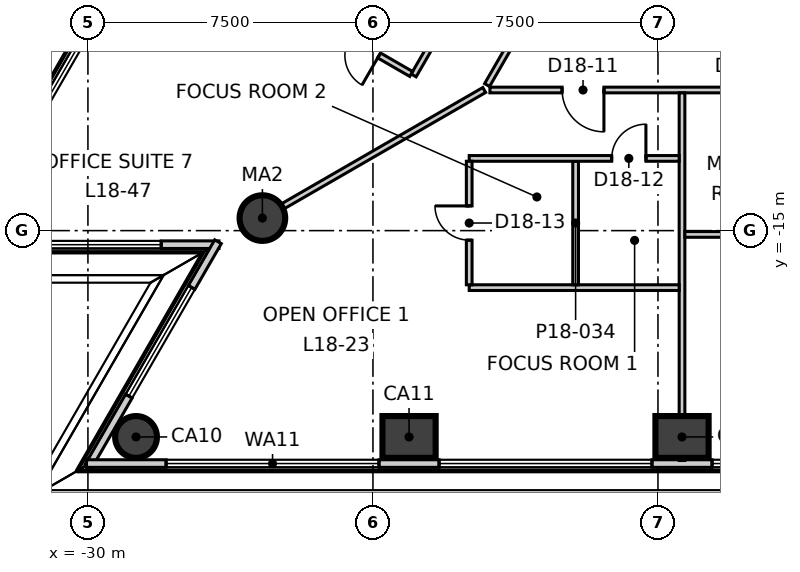
"""IFC4 building model, lengths in metres.
Left out: names, types, materials, properties, quantities, classifications, styles, units other than length and angle.
Written with IfcOpenShell. Run it as: python <this file> out.ifc"""

import sys

from ifc_helpers import new_model, si_unit, direction, frame, frame_2d, origin, origin_2d, place, context, subcontext, project, spatial, rectangle, circle, extrude, element, fill, save


model = new_model("IFC4")
c1 = context("Model", 3, precision=1e-05, world=origin(), true_north=direction((0.0, 1.0)))
c2 = subcontext(c1, "Body", "Model", "MODEL_VIEW")
j1 = project(units=[si_unit("LENGTHUNIT", "METRE"), si_unit("PLANEANGLEUNIT", "RADIAN")], contexts=[c1])
p1 = place(None, origin())
s1 = spatial("IfcSite", under=j1, at=p1, CompositionType="ELEMENT")
p2 = place(p1, origin())
s2 = spatial("IfcBuilding", under=s1, at=p2, CompositionType="ELEMENT")
p3 = place(p2, frame((0.0, 0.0, 83.3)))
s3 = spatial("IfcBuildingStorey", under=s2, at=p3, CompositionType="ELEMENT", Elevation=83.3)
p4 = place(p3, frame((-28.734, -20.429, -0.3), z_axis=(0.0, 0.0, 1.0), x_axis=(1.0, 0.0, 0.0)))
e1 = element("IfcColumn", 1, at=p4, inside=s3, PredefinedType="COLUMN", context=c2, shape_type="SweptSolid", body=[
    extrude(circle(Radius=0.55, at=origin_2d()), origin(), (0.0, 0.0, 1.0), 4.0),
])
for number, where, z_axis, x_axis in (
    (2, (-21.55, -20.429, -0.3), (0.0, 0.0, 1.0), (1.0, 0.0, 0.0)),
    (3, (-14.367, -20.429, -0.3), (0.0, 0.0, 1.0), (1.0, 0.0, 0.0)),
):
    element("IfcColumn", number, at=place(p3, frame(where, z_axis=z_axis, x_axis=x_axis)), inside=s3, PredefinedType="COLUMN", context=c2, shape_type="SweptSolid", body=[
        extrude(rectangle(XDim=1.4, YDim=1.1, at=origin_2d()), origin(), (0.0, 0.0, 1.0), 4.0),
    ])
p5 = place(p3, frame((-25.409, -14.67, -0.3), z_axis=(0.0, 0.0, 1.0), x_axis=(1.0, 0.0, 0.0)))
e4 = element("IfcColumn", 4, at=p5, inside=s3, PredefinedType="COLUMN", context=c2, shape_type="SweptSolid", body=[
    extrude(circle(Radius=0.6, at=origin_2d()), origin(), (0.0, 0.0, 1.0), 4.0),
])
p6 = place(p3, frame((-3.28, 36.577, 0.0), z_axis=(0.0, 0.0, 1.0), x_axis=(-0.500001635065, -0.866024459777, 0.0)))
e5 = element("IfcWall", 5, at=p6, inside=s3, PredefinedType="ELEMENTEDWALL", context=c2, shape_type="SweptSolid", body=[
    extrude(rectangle(XDim=60.053, YDim=0.2, at=frame_2d((30.027, 0.0))), origin(), (0.0, 0.0, 1.0), 3.7),
])
p7 = place(p6, frame((2.094, 0.0, 0.9)))
e6 = element("IfcOpeningElement", 6, at=p7, cuts=e5, PredefinedType="OPENING", context=c2, shape_type="SweptSolid", body=[
    extrude(rectangle(XDim=5.6, YDim=2.5, at=frame_2d((2.8, 1.25))), frame((0.0, 0.11, 0.0), z_axis=(0.0, -1.0, 0.0), x_axis=(1.0, 0.0, 0.0)), (0.0, 0.0, 1.0), 0.22),
])
p8 = place(p6, frame((9.278, 0.0, 0.9)))
e7 = element("IfcOpeningElement", 7, at=p8, cuts=e5, PredefinedType="OPENING", context=c2, shape_type="SweptSolid", body=[
    extrude(rectangle(XDim=5.6, YDim=2.5, at=frame_2d((2.8, 1.25))), frame((0.0, 0.11, 0.0), z_axis=(0.0, -1.0, 0.0), x_axis=(1.0, 0.0, 0.0)), (0.0, 0.0, 1.0), 0.22),
])
p9 = place(p6, frame((16.461, 0.0, 0.9)))
e8 = element("IfcOpeningElement", 8, at=p9, cuts=e5, PredefinedType="OPENING", context=c2, shape_type="SweptSolid", body=[
    extrude(rectangle(XDim=5.6, YDim=2.5, at=frame_2d((2.8, 1.25))), frame((0.0, 0.11, 0.0), z_axis=(0.0, -1.0, 0.0), x_axis=(1.0, 0.0, 0.0)), (0.0, 0.0, 1.0), 0.22),
])
p10 = place(p6, frame((23.645, 0.0, 0.9)))
e9 = element("IfcOpeningElement", 9, at=p10, cuts=e5, PredefinedType="OPENING", context=c2, shape_type="SweptSolid", body=[
    extrude(rectangle(XDim=5.6, YDim=2.5, at=frame_2d((2.8, 1.25))), frame((0.0, 0.11, 0.0), z_axis=(0.0, -1.0, 0.0), x_axis=(1.0, 0.0, 0.0)), (0.0, 0.0, 1.0), 0.22),
])
p11 = place(p6, frame((30.828, 0.0, 0.9)))
e10 = element("IfcOpeningElement", 10, at=p11, cuts=e5, PredefinedType="OPENING", context=c2, shape_type="SweptSolid", body=[
    extrude(rectangle(XDim=5.6, YDim=2.5, at=frame_2d((2.8, 1.25))), frame((0.0, 0.11, 0.0), z_axis=(0.0, -1.0, 0.0), x_axis=(1.0, 0.0, 0.0)), (0.0, 0.0, 1.0), 0.22),
])
p12 = place(p6, frame((38.012, 0.0, 0.9)))
e11 = element("IfcOpeningElement", 11, at=p12, cuts=e5, PredefinedType="OPENING", context=c2, shape_type="SweptSolid", body=[
    extrude(rectangle(XDim=5.6, YDim=2.5, at=frame_2d((2.8, 1.25))), frame((0.0, 0.11, 0.0), z_axis=(0.0, -1.0, 0.0), x_axis=(1.0, 0.0, 0.0)), (0.0, 0.0, 1.0), 0.22),
])
p13 = place(p6, frame((45.195, 0.0, 0.9)))
e12 = element("IfcOpeningElement", 12, at=p13, cuts=e5, PredefinedType="OPENING", context=c2, shape_type="SweptSolid", body=[
    extrude(rectangle(XDim=5.6, YDim=2.5, at=frame_2d((2.8, 1.25))), frame((0.0, 0.11, 0.0), z_axis=(0.0, -1.0, 0.0), x_axis=(1.0, 0.0, 0.0)), (0.0, 0.0, 1.0), 0.22),
])
p14 = place(p6, frame((52.379, 0.0, 0.9)))
e13 = element("IfcOpeningElement", 13, at=p14, cuts=e5, PredefinedType="OPENING", context=c2, shape_type="SweptSolid", body=[
    extrude(rectangle(XDim=5.6, YDim=2.5, at=frame_2d((2.8, 1.25))), frame((0.0, 0.11, 0.0), z_axis=(0.0, -1.0, 0.0), x_axis=(1.0, 0.0, 0.0)), (0.0, 0.0, 1.0), 0.22),
])
p15 = place(p3, frame((-33.362, -15.37, 0.0), z_axis=(0.0, 0.0, 1.0), x_axis=(1.0, 0.0, 0.0)))
e14 = element("IfcWall", 14, at=p15, inside=s3, PredefinedType="ELEMENTEDWALL", context=c2, shape_type="SweptSolid", body=[
    extrude(rectangle(XDim=6.81, YDim=0.2, at=frame_2d((3.405, 0.0))), origin(), (0.0, 0.0, 1.0), 3.7),
])
p16 = place(p15, frame((1.99, 0.0, 0.9)))
e15 = element("IfcOpeningElement", 15, at=p16, cuts=e14, PredefinedType="OPENING", context=c2, shape_type="SweptSolid", body=[
    extrude(rectangle(XDim=3.3, YDim=2.5, at=frame_2d((1.65, 1.25))), frame((0.0, 0.11, 0.0), z_axis=(0.0, -1.0, 0.0), x_axis=(1.0, 0.0, 0.0)), (0.0, 0.0, 1.0), 0.22),
])
p17 = place(p3, frame((-26.577, -15.292, 0.0), z_axis=(0.0, 0.0, 1.0), x_axis=(-0.499983120418, -0.866035148996, 0.0)))
e16 = element("IfcWall", 16, at=p17, inside=s3, PredefinedType="ELEMENTEDWALL", context=c2, shape_type="SweptSolid", body=[
    extrude(rectangle(XDim=6.81, YDim=0.2, at=frame_2d((3.405, 0.0))), origin(), (0.0, 0.0, 1.0), 3.7),
])
p18 = place(p17, frame((1.39, 0.0, 0.9)))
e17 = element("IfcOpeningElement", 17, at=p18, cuts=e16, PredefinedType="OPENING", context=c2, shape_type="SweptSolid", body=[
    extrude(rectangle(XDim=3.3, YDim=2.5, at=frame_2d((1.65, 1.25))), frame((0.0, 0.11, 0.0), z_axis=(0.0, -1.0, 0.0), x_axis=(1.0, 0.0, 0.0)), (0.0, 0.0, 1.0), 0.22),
])
p19 = place(p3, frame((-30.037, -21.129, 0.0), z_axis=(0.0, 0.0, 1.0), x_axis=(1.0, 0.0, 0.0)))
e18 = element("IfcWall", 18, at=p19, inside=s3, PredefinedType="ELEMENTEDWALL", context=c2, shape_type="SweptSolid", body=[
    extrude(rectangle(XDim=60.054, YDim=0.2, at=frame_2d((30.027, 0.0))), origin(), (0.0, 0.0, 1.0), 3.7),
])
p20 = place(p19, frame((2.095, 0.0, 0.9)))
e19 = element("IfcOpeningElement", 19, at=p20, cuts=e18, PredefinedType="OPENING", context=c2, shape_type="SweptSolid", body=[
    extrude(rectangle(XDim=5.6, YDim=2.5, at=frame_2d((2.8, 1.25))), frame((0.0, 0.11, 0.0), z_axis=(0.0, -1.0, 0.0), x_axis=(1.0, 0.0, 0.0)), (0.0, 0.0, 1.0), 0.22),
])
p21 = place(p19, frame((9.278, 0.0, 0.9)))
e20 = element("IfcOpeningElement", 20, at=p21, cuts=e18, PredefinedType="OPENING", context=c2, shape_type="SweptSolid", body=[
    extrude(rectangle(XDim=5.6, YDim=2.5, at=frame_2d((2.8, 1.25))), frame((0.0, 0.11, 0.0), z_axis=(0.0, -1.0, 0.0), x_axis=(1.0, 0.0, 0.0)), (0.0, 0.0, 1.0), 0.22),
])
p22 = place(p19, frame((16.462, 0.0, 0.9)))
e21 = element("IfcOpeningElement", 21, at=p22, cuts=e18, PredefinedType="OPENING", context=c2, shape_type="SweptSolid", body=[
    extrude(rectangle(XDim=5.6, YDim=2.5, at=frame_2d((2.8, 1.25))), frame((0.0, 0.11, 0.0), z_axis=(0.0, -1.0, 0.0), x_axis=(1.0, 0.0, 0.0)), (0.0, 0.0, 1.0), 0.22),
])
p23 = place(p19, frame((23.645, 0.0, 0.9)))
e22 = element("IfcOpeningElement", 22, at=p23, cuts=e18, PredefinedType="OPENING", context=c2, shape_type="SweptSolid", body=[
    extrude(rectangle(XDim=5.6, YDim=2.5, at=frame_2d((2.8, 1.25))), frame((0.0, 0.11, 0.0), z_axis=(0.0, -1.0, 0.0), x_axis=(1.0, 0.0, 0.0)), (0.0, 0.0, 1.0), 0.22),
])
p24 = place(p19, frame((30.829, 0.0, 0.9)))
e23 = element("IfcOpeningElement", 23, at=p24, cuts=e18, PredefinedType="OPENING", context=c2, shape_type="SweptSolid", body=[
    extrude(rectangle(XDim=5.6, YDim=2.5, at=frame_2d((2.8, 1.25))), frame((0.0, 0.11, 0.0), z_axis=(0.0, -1.0, 0.0), x_axis=(1.0, 0.0, 0.0)), (0.0, 0.0, 1.0), 0.22),
])
p25 = place(p19, frame((38.012, 0.0, 0.9)))
e24 = element("IfcOpeningElement", 24, at=p25, cuts=e18, PredefinedType="OPENING", context=c2, shape_type="SweptSolid", body=[
    extrude(rectangle(XDim=5.6, YDim=2.5, at=frame_2d((2.8, 1.25))), frame((0.0, 0.11, 0.0), z_axis=(0.0, -1.0, 0.0), x_axis=(1.0, 0.0, 0.0)), (0.0, 0.0, 1.0), 0.22),
])
p26 = place(p19, frame((45.196, 0.0, 0.9)))
e25 = element("IfcOpeningElement", 25, at=p26, cuts=e18, PredefinedType="OPENING", context=c2, shape_type="SweptSolid", body=[
    extrude(rectangle(XDim=5.6, YDim=2.5, at=frame_2d((2.8, 1.25))), frame((0.0, 0.11, 0.0), z_axis=(0.0, -1.0, 0.0), x_axis=(1.0, 0.0, 0.0)), (0.0, 0.0, 1.0), 0.22),
])
p27 = place(p19, frame((52.379, 0.0, 0.9)))
e26 = element("IfcOpeningElement", 26, at=p27, cuts=e18, PredefinedType="OPENING", context=c2, shape_type="SweptSolid", body=[
    extrude(rectangle(XDim=5.6, YDim=2.5, at=frame_2d((2.8, 1.25))), frame((0.0, 0.11, 0.0), z_axis=(0.0, -1.0, 0.0), x_axis=(1.0, 0.0, 0.0)), (0.0, 0.0, 1.0), 0.22),
])
p28 = place(p3, frame((-25.946, -14.98, 0.0), z_axis=(0.0, 0.0, 1.0), x_axis=(0.866032022822, 0.499988535315, 0.0)))
e27 = element("IfcWall", 27, at=p28, inside=s3, PredefinedType="PARTITIONING", context=c2, shape_type="SweptSolid", body=[
    extrude(rectangle(XDim=7.36, YDim=0.15, at=frame_2d((3.68, 0.0))), origin(), (0.0, 0.0, 1.0), 3.15),
])
p29 = place(p3, frame((-19.497, -11.17, 0.0), z_axis=(0.0, 0.0, 1.0), x_axis=(0.499998854553, 0.866026065108, 0.0)))
e28 = element("IfcWall", 28, at=p29, inside=s3, PredefinedType="PARTITIONING", context=c2, shape_type="SweptSolid", body=[
    extrude(rectangle(XDim=38.994, YDim=0.15, at=frame_2d((19.497, 0.0))), origin(), (0.0, 0.0, 1.0), 3.7),
])
p30 = place(p29, frame((35.844, 0.0, 0.0)))
e29 = element("IfcOpeningElement", 29, at=p30, cuts=e28, PredefinedType="OPENING", context=c2, shape_type="SweptSolid", body=[
    extrude(rectangle(XDim=1.1, YDim=2.1, at=frame_2d((0.55, 1.05))), frame((0.0, 0.085, 0.0), z_axis=(0.0, -1.0, 0.0), x_axis=(1.0, 0.0, 0.0)), (0.0, 0.0, 1.0), 0.17),
])
p31 = place(p29, frame((26.04, 0.0, 0.0)))
e30 = element("IfcOpeningElement", 30, at=p31, cuts=e28, PredefinedType="OPENING", context=c2, shape_type="SweptSolid", body=[
    extrude(rectangle(XDim=1.1, YDim=2.1, at=frame_2d((0.55, 1.05))), frame((0.0, 0.085, 0.0), z_axis=(0.0, -1.0, 0.0), x_axis=(1.0, 0.0, 0.0)), (0.0, 0.0, 1.0), 0.17),
])
p32 = place(p29, frame((7.272, 0.0, 0.0)))
e31 = element("IfcOpeningElement", 31, at=p32, cuts=e28, PredefinedType="OPENING", context=c2, shape_type="SweptSolid", body=[
    extrude(rectangle(XDim=1.1, YDim=2.1, at=frame_2d((0.55, 1.05))), frame((0.0, 0.085, 0.0), z_axis=(0.0, -1.0, 0.0), x_axis=(1.0, 0.0, 0.0)), (0.0, 0.0, 1.0), 0.17),
])
p33 = place(p29, frame((17.372, 0.0, 0.0)))
e32 = element("IfcOpeningElement", 32, at=p33, cuts=e28, PredefinedType="OPENING", context=c2, shape_type="SweptSolid", body=[
    extrude(rectangle(XDim=0.9, YDim=2.1, at=frame_2d((0.45, 1.05))), frame((0.0, 0.085, 0.0), z_axis=(0.0, -1.0, 0.0), x_axis=(1.0, 0.0, 0.0)), (0.0, 0.0, 1.0), 0.17),
])
p34 = place(p29, frame((14.172, 0.0, 0.0)))
e33 = element("IfcOpeningElement", 33, at=p34, cuts=e28, PredefinedType="OPENING", context=c2, shape_type="SweptSolid", body=[
    extrude(rectangle(XDim=0.9, YDim=2.1, at=frame_2d((0.45, 1.05))), frame((0.0, 0.085, 0.0), z_axis=(0.0, -1.0, 0.0), x_axis=(1.0, 0.0, 0.0)), (0.0, 0.0, 1.0), 0.17),
])
p35 = place(p29, frame((11.272, 0.0, 0.0)))
e34 = element("IfcOpeningElement", 34, at=p35, cuts=e28, PredefinedType="OPENING", context=c2, shape_type="SweptSolid", body=[
    extrude(rectangle(XDim=1.0, YDim=2.1, at=frame_2d((0.5, 1.05))), frame((0.0, 0.085, 0.0), z_axis=(0.0, -1.0, 0.0), x_axis=(1.0, 0.0, 0.0)), (0.0, 0.0, 1.0), 0.17),
])
p36 = place(p29, frame((1.904, 0.0, 0.0)))
e35 = element("IfcOpeningElement", 35, at=p36, cuts=e28, PredefinedType="OPENING", context=c2, shape_type="SweptSolid", body=[
    extrude(rectangle(XDim=1.1, YDim=2.1, at=frame_2d((0.55, 1.05))), frame((0.0, 0.085, 0.0), z_axis=(0.0, -1.0, 0.0), x_axis=(1.0, 0.0, 0.0)), (0.0, 0.0, 1.0), 0.17),
])
p37 = place(p3, frame((-19.422, -11.3, 0.0), z_axis=(0.0, 0.0, 1.0), x_axis=(1.0, 0.0, 0.0)))
e36 = element("IfcWall", 36, at=p37, inside=s3, PredefinedType="PARTITIONING", context=c2, shape_type="SweptSolid", body=[
    extrude(rectangle(XDim=38.994, YDim=0.15, at=frame_2d((19.497, 0.0))), origin(), (0.0, 0.0, 1.0), 3.7),
])
p38 = place(p37, frame((1.9, 0.0, 0.0)))
e37 = element("IfcOpeningElement", 37, at=p38, cuts=e36, PredefinedType="OPENING", context=c2, shape_type="SweptSolid", body=[
    extrude(rectangle(XDim=1.1, YDim=2.1, at=frame_2d((0.55, 1.05))), frame((0.0, 0.085, 0.0), z_axis=(0.0, -1.0, 0.0), x_axis=(1.0, 0.0, 0.0)), (0.0, 0.0, 1.0), 0.17),
])
p39 = place(p37, frame((11.705, 0.0, 0.0)))
e38 = element("IfcOpeningElement", 38, at=p39, cuts=e36, PredefinedType="OPENING", context=c2, shape_type="SweptSolid", body=[
    extrude(rectangle(XDim=1.1, YDim=2.1, at=frame_2d((0.55, 1.05))), frame((0.0, 0.085, 0.0), z_axis=(0.0, -1.0, 0.0), x_axis=(1.0, 0.0, 0.0)), (0.0, 0.0, 1.0), 0.17),
])
p40 = place(p37, frame((6.405, 0.0, 0.0)))
e39 = element("IfcOpeningElement", 39, at=p40, cuts=e36, PredefinedType="OPENING", context=c2, shape_type="SweptSolid", body=[
    extrude(rectangle(XDim=0.9, YDim=2.1, at=frame_2d((0.45, 1.05))), frame((0.0, 0.085, 0.0), z_axis=(0.0, -1.0, 0.0), x_axis=(1.0, 0.0, 0.0)), (0.0, 0.0, 1.0), 0.17),
])
p41 = place(p37, frame((9.405, 0.0, 0.0)))
e40 = element("IfcOpeningElement", 40, at=p41, cuts=e36, PredefinedType="OPENING", context=c2, shape_type="SweptSolid", body=[
    extrude(rectangle(XDim=0.9, YDim=2.1, at=frame_2d((0.45, 1.05))), frame((0.0, 0.085, 0.0), z_axis=(0.0, -1.0, 0.0), x_axis=(1.0, 0.0, 0.0)), (0.0, 0.0, 1.0), 0.17),
])
p42 = place(p37, frame((22.472, 0.0, 0.0)))
e41 = element("IfcOpeningElement", 41, at=p42, cuts=e36, PredefinedType="OPENING", context=c2, shape_type="SweptSolid", body=[
    extrude(rectangle(XDim=1.0, YDim=2.1, at=frame_2d((0.5, 1.05))), frame((0.0, 0.085, 0.0), z_axis=(0.0, -1.0, 0.0), x_axis=(1.0, 0.0, 0.0)), (0.0, 0.0, 1.0), 0.17),
])
p43 = place(p37, frame((29.656, 0.0, 0.0)))
e42 = element("IfcOpeningElement", 42, at=p43, cuts=e36, PredefinedType="OPENING", context=c2, shape_type="SweptSolid", body=[
    extrude(rectangle(XDim=1.0, YDim=2.1, at=frame_2d((0.5, 1.05))), frame((0.0, 0.085, 0.0), z_axis=(0.0, -1.0, 0.0), x_axis=(1.0, 0.0, 0.0)), (0.0, 0.0, 1.0), 0.17),
])
p44 = place(p37, frame((35.839, 0.0, 0.0)))
e43 = element("IfcOpeningElement", 43, at=p44, cuts=e36, PredefinedType="OPENING", context=c2, shape_type="SweptSolid", body=[
    extrude(rectangle(XDim=1.1, YDim=2.1, at=frame_2d((0.55, 1.05))), frame((0.0, 0.085, 0.0), z_axis=(0.0, -1.0, 0.0), x_axis=(1.0, 0.0, 0.0)), (0.0, 0.0, 1.0), 0.17),
])
p45 = place(p3, frame((-14.367, -21.049, 0.0), z_axis=(0.0, 0.0, 1.0), x_axis=(0.0, 1.0, 0.0)))
e44 = element("IfcWall", 44, at=p45, inside=s3, PredefinedType="PARTITIONING", context=c2, shape_type="SweptSolid", body=[
    extrude(rectangle(XDim=9.674, YDim=0.15, at=frame_2d((4.837, 0.0))), origin(), (0.0, 0.0, 1.0), 3.7),
])
p46 = place(p3, frame((-14.292, -15.1, 0.0), z_axis=(0.0, 0.0, 1.0), x_axis=(1.0, 0.0, 0.0)))
e45 = element("IfcWall", 45, at=p46, inside=s3, PredefinedType="PARTITIONING", context=c2, shape_type="SweptSolid", body=[
    extrude(rectangle(XDim=3.525, YDim=0.15, at=frame_2d((1.762, 0.0))), origin(), (0.0, 0.0, 1.0), 3.7),
])
p47 = place(p3, frame((-21.429, -10.916, 0.0), z_axis=(0.0, 0.0, 1.0), x_axis=(0.500069422629, 0.865985318901, 0.0)))
e46 = element("IfcWall", 46, at=p47, inside=s3, PredefinedType="PARTITIONING", context=c2, shape_type="SweptSolid", body=[
    extrude(rectangle(XDim=5.725, YDim=0.15, at=frame_2d((2.863, 0.0))), origin(), (0.0, 0.0, 1.0), 3.7),
])
p48 = place(p3, frame((-23.962, -9.453, 0.0), z_axis=(0.0, 0.0, 1.0), x_axis=(0.866004402611, -0.500036373335, 0.0)))
e47 = element("IfcWall", 47, at=p48, inside=s3, PredefinedType="PARTITIONING", context=c2, shape_type="SweptSolid", body=[
    extrude(rectangle(XDim=2.85, YDim=0.15, at=frame_2d((1.425, 0.0))), origin(), (0.0, 0.0, 1.0), 3.7),
])
p49 = place(p48, frame((0.975, 0.0, 0.0)))
e48 = element("IfcOpeningElement", 48, at=p49, cuts=e47, PredefinedType="OPENING", context=c2, shape_type="SweptSolid", body=[
    extrude(rectangle(XDim=0.9, YDim=2.1, at=frame_2d((0.45, 1.05))), frame((0.0, 0.085, 0.0), z_axis=(0.0, -1.0, 0.0), x_axis=(1.0, 0.0, 0.0)), (0.0, 0.0, 1.0), 0.17),
])
p50 = place(p3, frame((-19.967, -16.5, 0.0), z_axis=(0.0, 0.0, 1.0), x_axis=(1.0, 0.0, 0.0)))
e49 = element("IfcWall", 49, at=p50, inside=s3, PredefinedType="PARTITIONING", context=c2, shape_type="SweptSolid", body=[
    extrude(rectangle(XDim=5.525, YDim=0.15, at=frame_2d((2.763, 0.0))), origin(), (0.0, 0.0, 1.0), 3.7),
])
p51 = place(p3, frame((-17.167, -16.425, 0.0), z_axis=(0.0, 0.0, 1.0), x_axis=(0.0, 1.0, 0.0)))
e50 = element("IfcWall", 50, at=p51, inside=s3, PredefinedType="PARTITIONING", context=c2, shape_type="SweptSolid", body=[
    extrude(rectangle(XDim=3.25, YDim=0.15, at=frame_2d((1.625, 0.0))), origin(), (0.0, 0.0, 1.0), 3.7),
])
p52 = place(p3, frame((-19.967, -13.1, 0.0), z_axis=(0.0, 0.0, 1.0), x_axis=(1.0, 0.0, 0.0)))
e51 = element("IfcWall", 51, at=p52, inside=s3, PredefinedType="PARTITIONING", context=c2, shape_type="SweptSolid", body=[
    extrude(rectangle(XDim=5.525, YDim=0.15, at=frame_2d((2.763, 0.0))), origin(), (0.0, 0.0, 1.0), 3.7),
])
p53 = place(p52, frame((3.75, 0.0, 0.0)))
e52 = element("IfcOpeningElement", 52, at=p53, cuts=e51, PredefinedType="OPENING", context=c2, shape_type="SweptSolid", body=[
    extrude(rectangle(XDim=0.9, YDim=2.1, at=frame_2d((0.45, 1.05))), frame((0.0, 0.085, 0.0), z_axis=(0.0, -1.0, 0.0), x_axis=(1.0, 0.0, 0.0)), (0.0, 0.0, 1.0), 0.17),
])
p54 = place(p3, frame((-19.967, -16.425, 0.0), z_axis=(0.0, 0.0, 1.0), x_axis=(0.0, 1.0, 0.0)))
e53 = element("IfcWall", 53, at=p54, inside=s3, PredefinedType="PARTITIONING", context=c2, shape_type="SweptSolid", body=[
    extrude(rectangle(XDim=3.25, YDim=0.15, at=frame_2d((1.625, 0.0))), origin(), (0.0, 0.0, 1.0), 3.7),
])
p55 = place(p54, frame((1.175, 0.0, 0.0)))
e54 = element("IfcOpeningElement", 54, at=p55, cuts=e53, PredefinedType="OPENING", context=c2, shape_type="SweptSolid", body=[
    extrude(rectangle(XDim=0.9, YDim=2.1, at=frame_2d((0.45, 1.05))), frame((0.0, 0.085, 0.0), z_axis=(0.0, -1.0, 0.0), x_axis=(1.0, 0.0, 0.0)), (0.0, 0.0, 1.0), 0.17),
])
p56 = place(p14, origin())
e55 = element("IfcWindow", 55, at=p56, inside=s3, PartitioningType="SINGLE_PANEL", PredefinedType="WINDOW", context=c2, shape_type="SweptSolid", body=[
    extrude(rectangle(XDim=5.6, YDim=2.5, at=frame_2d((2.8, 1.25))), frame((0.0, 0.03, 0.0), z_axis=(0.0, -1.0, 0.0), x_axis=(1.0, 0.0, 0.0)), (0.0, 0.0, 1.0), 0.06),
])
fill(e13, e55)
p57 = place(p16, origin())
e56 = element("IfcWindow", 56, at=p57, inside=s3, PartitioningType="SINGLE_PANEL", PredefinedType="WINDOW", context=c2, shape_type="SweptSolid", body=[
    extrude(rectangle(XDim=3.3, YDim=2.5, at=frame_2d((1.65, 1.25))), frame((0.0, 0.03, 0.0), z_axis=(0.0, -1.0, 0.0), x_axis=(1.0, 0.0, 0.0)), (0.0, 0.0, 1.0), 0.06),
])
fill(e15, e56)
p58 = place(p18, origin())
e57 = element("IfcWindow", 57, at=p58, inside=s3, PartitioningType="SINGLE_PANEL", PredefinedType="WINDOW", context=c2, shape_type="SweptSolid", body=[
    extrude(rectangle(XDim=3.3, YDim=2.5, at=frame_2d((1.65, 1.25))), frame((0.0, 0.03, 0.0), z_axis=(0.0, -1.0, 0.0), x_axis=(1.0, 0.0, 0.0)), (0.0, 0.0, 1.0), 0.06),
])
fill(e17, e57)
p59 = place(p20, origin())
e58 = element("IfcWindow", 58, at=p59, inside=s3, PartitioningType="SINGLE_PANEL", PredefinedType="WINDOW", context=c2, shape_type="SweptSolid", body=[
    extrude(rectangle(XDim=5.6, YDim=2.5, at=frame_2d((2.8, 1.25))), frame((0.0, 0.03, 0.0), z_axis=(0.0, -1.0, 0.0), x_axis=(1.0, 0.0, 0.0)), (0.0, 0.0, 1.0), 0.06),
])
fill(e19, e58)
p60 = place(p21, origin())
e59 = element("IfcWindow", 59, at=p60, inside=s3, PartitioningType="SINGLE_PANEL", PredefinedType="WINDOW", context=c2, shape_type="SweptSolid", body=[
    extrude(rectangle(XDim=5.6, YDim=2.5, at=frame_2d((2.8, 1.25))), frame((0.0, 0.03, 0.0), z_axis=(0.0, -1.0, 0.0), x_axis=(1.0, 0.0, 0.0)), (0.0, 0.0, 1.0), 0.06),
])
fill(e20, e59)
p61 = place(p22, origin())
e60 = element("IfcWindow", 60, at=p61, inside=s3, PartitioningType="SINGLE_PANEL", PredefinedType="WINDOW", context=c2, shape_type="SweptSolid", body=[
    extrude(rectangle(XDim=5.6, YDim=2.5, at=frame_2d((2.8, 1.25))), frame((0.0, 0.03, 0.0), z_axis=(0.0, -1.0, 0.0), x_axis=(1.0, 0.0, 0.0)), (0.0, 0.0, 1.0), 0.06),
])
fill(e21, e60)
p62 = place(p38, origin())
e61 = element("IfcDoor", 61, at=p62, inside=s3, OperationType="SINGLE_SWING_RIGHT", PredefinedType="DOOR", context=c2, shape_type="SweptSolid", body=[
    extrude(rectangle(XDim=1.1, YDim=2.1, at=frame_2d((0.55, 1.05))), frame((0.0, 0.025, 0.0), z_axis=(0.0, -1.0, 0.0), x_axis=(1.0, 0.0, 0.0)), (0.0, 0.0, 1.0), 0.05),
])
fill(e37, e61)
p63 = place(p53, origin())
e62 = element("IfcDoor", 62, at=p63, inside=s3, OperationType="SINGLE_SWING_LEFT", PredefinedType="DOOR", context=c2, shape_type="SweptSolid", body=[
    extrude(rectangle(XDim=0.9, YDim=2.1, at=frame_2d((0.45, 1.05))), frame((0.0, 0.025, 0.0), z_axis=(0.0, -1.0, 0.0), x_axis=(1.0, 0.0, 0.0)), (0.0, 0.0, 1.0), 0.05),
])
fill(e52, e62)
p64 = place(p55, origin())
e63 = element("IfcDoor", 63, at=p64, inside=s3, OperationType="SINGLE_SWING_LEFT", PredefinedType="DOOR", context=c2, shape_type="SweptSolid", body=[
    extrude(rectangle(XDim=0.9, YDim=2.1, at=frame_2d((0.45, 1.05))), frame((0.0, 0.025, 0.0), z_axis=(0.0, -1.0, 0.0), x_axis=(1.0, 0.0, 0.0)), (0.0, 0.0, 1.0), 0.05),
])
fill(e54, e63)
p65 = place(p49, origin())
e64 = element("IfcDoor", 64, at=p65, inside=s3, OperationType="SINGLE_SWING_RIGHT", PredefinedType="DOOR", context=c2, shape_type="SweptSolid", body=[
    extrude(rectangle(XDim=0.9, YDim=2.1, at=frame_2d((0.45, 1.05))), frame((0.0, 0.025, 0.0), z_axis=(0.0, -1.0, 0.0), x_axis=(1.0, 0.0, 0.0)), (0.0, 0.0, 1.0), 0.05),
])
fill(e48, e64)
save(model, sys.argv[1])
